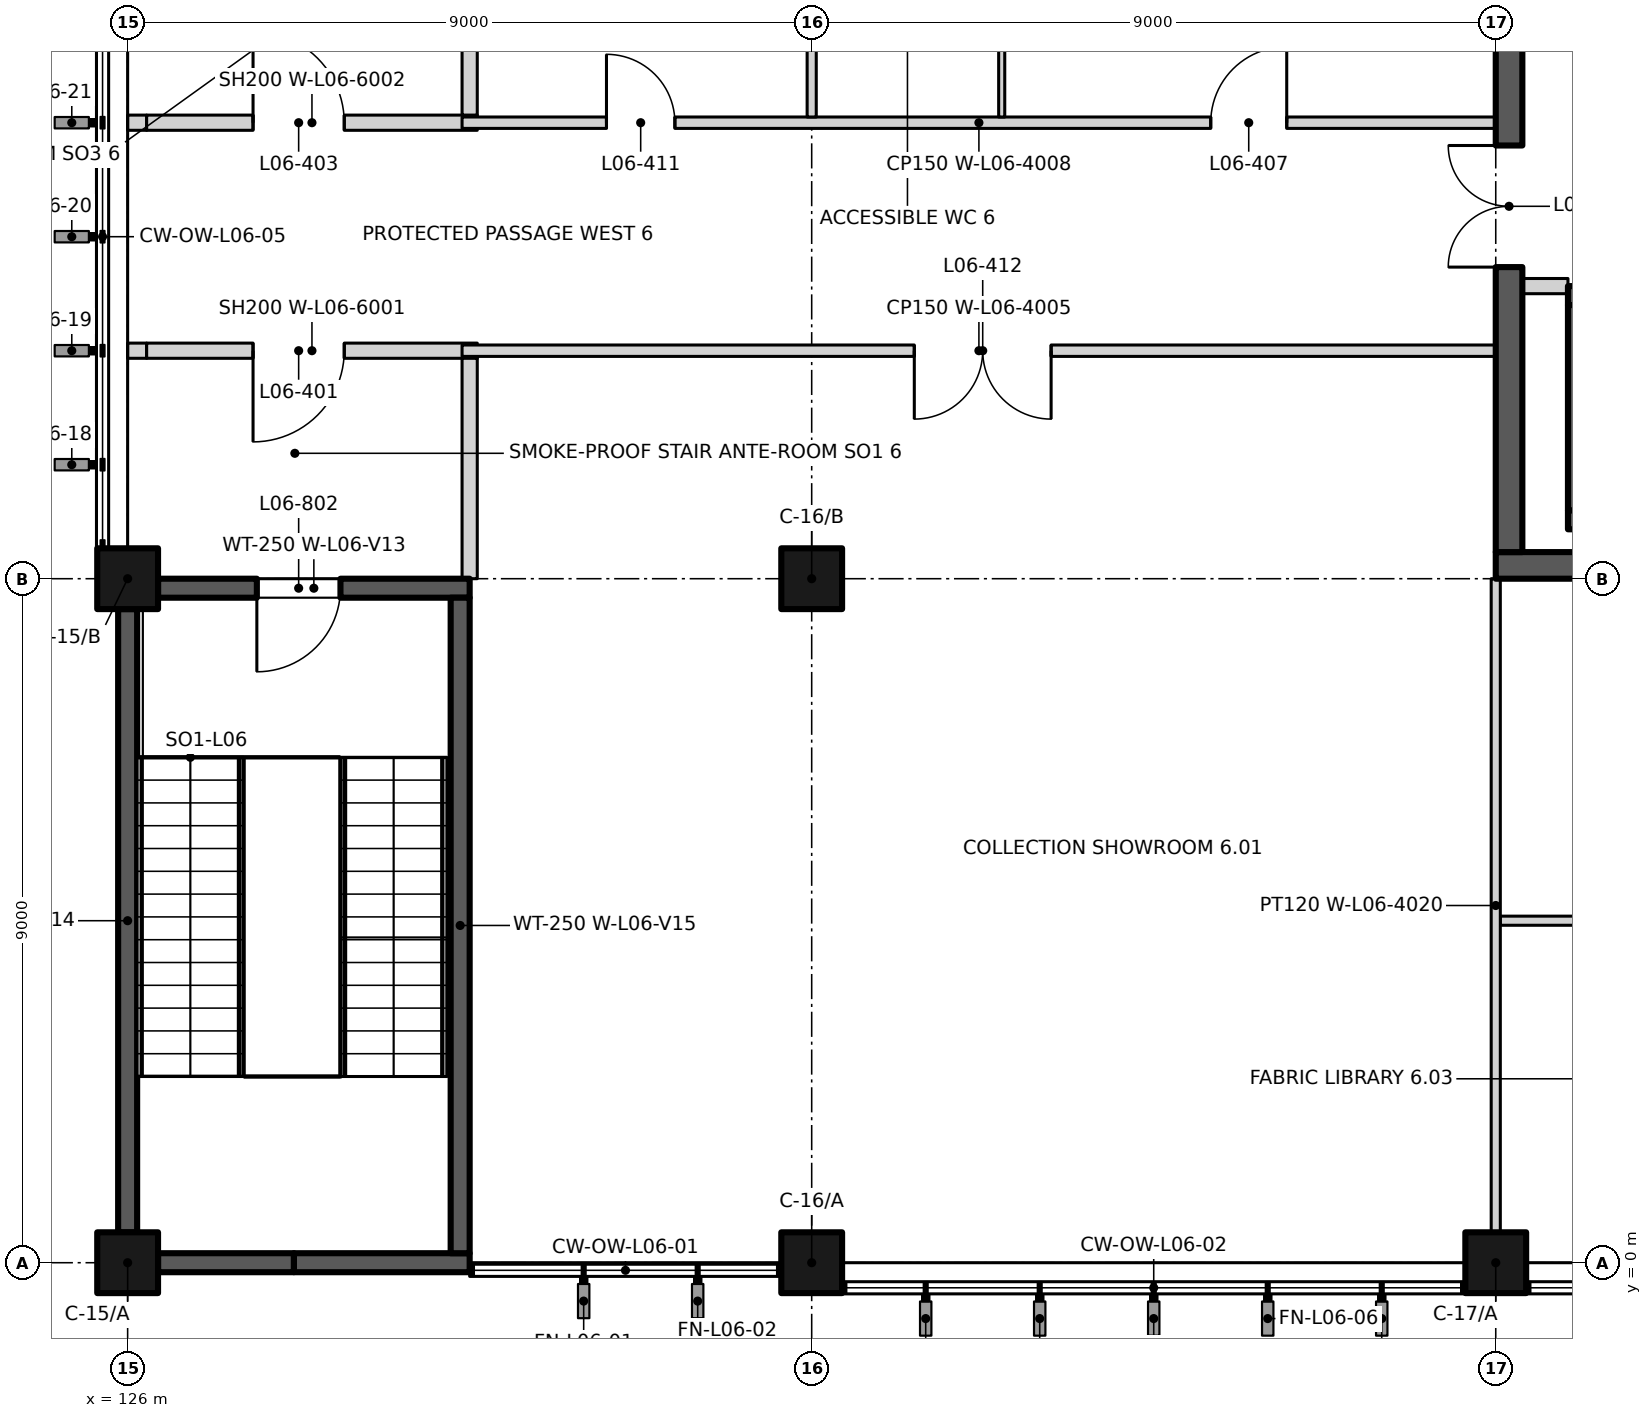
"""IFC4 building model, lengths in metres.
Left out: names, types, materials, properties, quantities, classifications, styles, units other than length and angle.
Written with IfcOpenShell. Run it as: python <this file> out.ifc"""

import sys

from ifc_helpers import new_model, si_unit, direction, frame, frame_2d, origin, origin_2d, place, context, subcontext, project, spatial, rectangle, extrude, element, fill, save


model = new_model("IFC4")
c1 = context("Model", 3, precision=1e-05, world=origin(), true_north=direction((0.0, 1.0)))
c2 = subcontext(c1, "Body", "Model", "MODEL_VIEW")
j1 = project(units=[si_unit("LENGTHUNIT", "METRE"), si_unit("PLANEANGLEUNIT", "RADIAN")], contexts=[c1])
p1 = place(None, origin())
s1 = spatial("IfcSite", under=j1, at=p1, CompositionType="ELEMENT")
p2 = place(p1, origin())
s2 = spatial("IfcBuilding", under=s1, at=p2, CompositionType="ELEMENT")
p3 = place(p2, frame((0.0, 0.0, 28.5)))
s3 = spatial("IfcBuildingStorey", under=s2, at=p3, CompositionType="ELEMENT", Elevation=28.5)
for number, where, z_axis, x_axis in (
    (1, (126.0, 0.0, 0.0), (0.0, 0.0, 1.0), (1.0, 0.0, 0.0)),
    (2, (135.0, 0.0, 0.0), (0.0, 0.0, 1.0), (1.0, 0.0, 0.0)),
    (3, (144.0, 0.0, 0.0), (0.0, 0.0, 1.0), (1.0, 0.0, 0.0)),
    (4, (126.0, 9.0, 0.0), (0.0, 0.0, 1.0), (1.0, 0.0, 0.0)),
    (5, (135.0, 9.0, 0.0), (0.0, 0.0, 1.0), (1.0, 0.0, 0.0)),
):
    element("IfcColumn", number, at=place(p3, frame(where, z_axis=z_axis, x_axis=x_axis)), inside=s3, PredefinedType="COLUMN", context=c2, shape_type="SweptSolid", body=[
        extrude(rectangle(XDim=0.8, YDim=0.8, at=origin_2d()), origin(), (0.0, 0.0, 1.0), 4.5),
    ])
p4 = place(p3, frame((126.4, 0.0, 0.0), z_axis=(0.0, 0.0, 1.0), x_axis=(1.0, 0.0, 0.0)))
e6 = element("IfcWall", 6, at=p4, inside=s3, PredefinedType="SHEAR", context=c2, shape_type="SweptSolid", body=[
    extrude(rectangle(XDim=1.788, YDim=0.25, at=frame_2d((0.894, 0.0))), origin(), (0.0, 0.0, 1.0), 4.5),
])
p5 = place(p3, frame((128.188, 0.0, 0.0), z_axis=(0.0, 0.0, 1.0), x_axis=(1.0, 0.0, 0.0)))
e7 = element("IfcWall", 7, at=p5, inside=s3, PredefinedType="SHEAR", context=c2, shape_type="SweptSolid", body=[
    extrude(rectangle(XDim=2.312, YDim=0.25, at=frame_2d((1.156, 0.0))), origin(), (0.0, 0.0, 1.0), 4.5),
])
p6 = place(p3, frame((126.4, 8.875, 0.0), z_axis=(0.0, 0.0, 1.0), x_axis=(1.0, 0.0, 0.0)))
e8 = element("IfcWall", 8, at=p6, inside=s3, PredefinedType="SHEAR", context=c2, shape_type="SweptSolid", body=[
    extrude(rectangle(XDim=4.1, YDim=0.25, at=frame_2d((2.05, 0.0))), origin(), (0.0, 0.0, 1.0), 4.5),
])
p7 = place(p6, frame((2.4, 0.0, 0.0), z_axis=(0.0, 0.0, 1.0), x_axis=(-1.0, 0.0, 0.0)))
e9 = element("IfcOpeningElement", 9, at=p7, cuts=e8, PredefinedType="OPENING", context=c2, shape_type="SweptSolid", body=[
    extrude(rectangle(XDim=1.1, YDim=2.1, at=frame_2d((0.55, 1.05))), frame((0.0, 0.135, 0.0), z_axis=(0.0, -1.0, 0.0), x_axis=(1.0, 0.0, 0.0)), (0.0, 0.0, 1.0), 0.27),
])
p8 = place(p3, frame((126.0, 0.4, 0.0), z_axis=(0.0, 0.0, 1.0), x_axis=(0.0, 1.0, 0.0)))
e10 = element("IfcWall", 10, at=p8, inside=s3, PredefinedType="SHEAR", context=c2, shape_type="SweptSolid", body=[
    extrude(rectangle(XDim=8.2, YDim=0.25, at=frame_2d((4.1, 0.0))), origin(), (0.0, 0.0, 1.0), 4.5),
])
p9 = place(p3, frame((130.375, 0.125, 0.0), z_axis=(0.0, 0.0, 1.0), x_axis=(0.0, 1.0, 0.0)))
e11 = element("IfcWall", 11, at=p9, inside=s3, PredefinedType="SHEAR", context=c2, shape_type="SweptSolid", body=[
    extrude(rectangle(XDim=8.625, YDim=0.25, at=frame_2d((4.312, 0.0))), origin(), (0.0, 0.0, 1.0), 4.5),
])
p10 = place(p3, frame((144.95, 12.725, 0.0), z_axis=(0.0, 0.0, 1.0), x_axis=(1.0, 0.0, 0.0)))
e12 = element("IfcWall", 12, at=p10, inside=s3, PredefinedType="SHEAR", context=c2, shape_type="SweptSolid", body=[
    extrude(rectangle(XDim=12.05, YDim=0.25, at=frame_2d((6.025, 0.0))), origin(), (0.0, 0.0, 1.0), 4.5),
])
p11 = place(p10, frame((1.05, 0.0, 0.0)))
e13 = element("IfcOpeningElement", 13, at=p11, cuts=e12, PredefinedType="OPENING", context=c2, shape_type="SweptSolid", body=[
    extrude(rectangle(XDim=1.1, YDim=2.1, at=frame_2d((0.55, 1.05))), frame((0.0, 0.135, 0.0), z_axis=(0.0, -1.0, 0.0), x_axis=(1.0, 0.0, 0.0)), (0.0, 0.0, 1.0), 0.27),
])
p12 = place(p10, frame((4.0, 0.0, 0.0)))
e14 = element("IfcOpeningElement", 14, at=p12, cuts=e12, PredefinedType="OPENING", context=c2, shape_type="SweptSolid", body=[
    extrude(rectangle(XDim=1.1, YDim=2.1, at=frame_2d((0.55, 1.05))), frame((0.0, 0.135, 0.0), z_axis=(0.0, -1.0, 0.0), x_axis=(1.0, 0.0, 0.0)), (0.0, 0.0, 1.0), 0.27),
])
p13 = place(p10, frame((6.95, 0.0, 0.0)))
e15 = element("IfcOpeningElement", 15, at=p13, cuts=e12, PredefinedType="OPENING", context=c2, shape_type="SweptSolid", body=[
    extrude(rectangle(XDim=1.1, YDim=2.1, at=frame_2d((0.55, 1.05))), frame((0.0, 0.135, 0.0), z_axis=(0.0, -1.0, 0.0), x_axis=(1.0, 0.0, 0.0)), (0.0, 0.0, 1.0), 0.27),
])
p14 = place(p10, frame((9.9, 0.0, 0.0)))
e16 = element("IfcOpeningElement", 16, at=p14, cuts=e12, PredefinedType="OPENING", context=c2, shape_type="SweptSolid", body=[
    extrude(rectangle(XDim=1.1, YDim=2.1, at=frame_2d((0.55, 1.05))), frame((0.0, 0.135, 0.0), z_axis=(0.0, -1.0, 0.0), x_axis=(1.0, 0.0, 0.0)), (0.0, 0.0, 1.0), 0.27),
])
p15 = place(p3, frame((144.95, 9.775, 0.0), z_axis=(0.0, 0.0, 1.0), x_axis=(1.0, 0.0, 0.0)))
e17 = element("IfcWall", 17, at=p15, inside=s3, PredefinedType="SHEAR", context=c2, shape_type="SweptSolid", body=[
    extrude(rectangle(XDim=12.05, YDim=0.25, at=frame_2d((6.025, 0.0))), origin(), (0.0, 0.0, 1.0), 4.5),
])
p16 = place(p3, frame((145.075, 9.9, 0.0), z_axis=(0.0, 0.0, 1.0), x_axis=(0.0, 1.0, 0.0)))
e18 = element("IfcWall", 18, at=p16, inside=s3, PredefinedType="SHEAR", context=c2, shape_type="SweptSolid", body=[
    extrude(rectangle(XDim=2.7, YDim=0.25, at=frame_2d((1.35, 0.0))), origin(), (0.0, 0.0, 1.0), 4.5),
])
p17 = place(p3, frame((144.06, 4.5, 0.0), z_axis=(0.0, 0.0, 1.0), x_axis=(1.0, 0.0, 0.0)))
e19 = element("IfcWall", 19, at=p17, inside=s3, PredefinedType="PARTITIONING", context=c2, shape_type="SweptSolid", body=[
    extrude(rectangle(XDim=3.0, YDim=0.12, at=frame_2d((1.5, 0.0))), origin(), (0.0, 0.0, 1.0), 4.2),
])
p18 = place(p17, frame((1.89, 0.0, 0.0), z_axis=(0.0, 0.0, 1.0), x_axis=(-1.0, 0.0, 0.0)))
e20 = element("IfcOpeningElement", 20, at=p18, cuts=e19, PredefinedType="OPENING", context=c2, shape_type="SweptSolid", body=[
    extrude(rectangle(XDim=0.9, YDim=2.1, at=frame_2d((0.45, 1.05))), frame((0.0, 0.07, 0.0), z_axis=(0.0, -1.0, 0.0), x_axis=(1.0, 0.0, 0.0)), (0.0, 0.0, 1.0), 0.14),
])
p19 = place(p3, frame((144.0, 9.175, 0.0), z_axis=(0.0, 0.0, 1.0), x_axis=(1.0, 0.0, 0.0)))
e21 = element("IfcWall", 21, at=p19, inside=s3, PredefinedType="SHEAR", context=c2, shape_type="SweptSolid", body=[
    extrude(rectangle(XDim=18.0, YDim=0.35, at=frame_2d((9.0, 0.0))), origin(), (0.0, 0.0, 1.0), 4.2),
])
p20 = place(p19, frame((16.463, 0.0, 0.0), z_axis=(0.0, 0.0, 1.0), x_axis=(-1.0, 0.0, 0.0)))
e22 = element("IfcOpeningElement", 22, at=p20, cuts=e21, PredefinedType="OPENING", context=c2, shape_type="SweptSolid", body=[
    extrude(rectangle(XDim=2.1, YDim=2.4, at=frame_2d((1.05, 1.2))), frame((0.0, 0.185, 0.0), z_axis=(0.0, -1.0, 0.0), x_axis=(1.0, 0.0, 0.0)), (0.0, 0.0, 1.0), 0.37),
])
p21 = place(p3, frame((126.0, 12.0, 0.0), z_axis=(0.0, 0.0, 1.0), x_axis=(1.0, 0.0, 0.0)))
e23 = element("IfcWall", 23, at=p21, inside=s3, PredefinedType="PARTITIONING", context=c2, shape_type="SweptSolid", body=[
    extrude(rectangle(XDim=0.25, YDim=0.2, at=frame_2d((0.125, 0.0))), origin(), (0.0, 0.0, 1.0), 3.6),
])
p22 = place(p3, frame((126.25, 12.0, 0.0), z_axis=(0.0, 0.0, 1.0), x_axis=(1.0, 0.0, 0.0)))
e24 = element("IfcWall", 24, at=p22, inside=s3, PredefinedType="PARTITIONING", context=c2, shape_type="SweptSolid", body=[
    extrude(rectangle(XDim=4.35, YDim=0.2, at=frame_2d((2.175, 0.0))), origin(), (0.0, 0.0, 1.0), 4.2),
])
p23 = place(p22, frame((2.6, 0.0, 0.0), z_axis=(0.0, 0.0, 1.0), x_axis=(-1.0, 0.0, 0.0)))
e25 = element("IfcOpeningElement", 25, at=p23, cuts=e24, PredefinedType="OPENING", context=c2, shape_type="SweptSolid", body=[
    extrude(rectangle(XDim=1.2, YDim=2.1, at=frame_2d((0.6, 1.05))), frame((0.0, 0.11, 0.0), z_axis=(0.0, -1.0, 0.0), x_axis=(1.0, 0.0, 0.0)), (0.0, 0.0, 1.0), 0.22),
])
p24 = place(p3, frame((130.4, 12.0, 0.0), z_axis=(0.0, 0.0, 1.0), x_axis=(1.0, 0.0, 0.0)))
e26 = element("IfcWall", 26, at=p24, inside=s3, PredefinedType="PARTITIONING", context=c2, shape_type="SweptSolid", body=[
    extrude(rectangle(XDim=13.6, YDim=0.15, at=frame_2d((6.8, 0.0))), origin(), (0.0, 0.0, 1.0), 4.2),
])
p25 = place(p24, frame((7.75, 0.0, 0.0), z_axis=(0.0, 0.0, 1.0), x_axis=(-1.0, 0.0, 0.0)))
e27 = element("IfcOpeningElement", 27, at=p25, cuts=e26, PredefinedType="OPENING", context=c2, shape_type="SweptSolid", body=[
    extrude(rectangle(XDim=1.8, YDim=2.1, at=frame_2d((0.9, 1.05))), frame((0.0, 0.085, 0.0), z_axis=(0.0, -1.0, 0.0), x_axis=(1.0, 0.0, 0.0)), (0.0, 0.0, 1.0), 0.17),
])
p26 = place(p3, frame((144.35, 12.85, 0.0), z_axis=(0.0, 0.0, 1.0), x_axis=(1.0, 0.0, 0.0)))
e28 = element("IfcWall", 28, at=p26, inside=s3, PredefinedType="PARTITIONING", context=c2, shape_type="SweptSolid", body=[
    extrude(rectangle(XDim=0.6, YDim=0.2, at=frame_2d((0.3, 0.0))), origin(), (0.0, 0.0, 1.0), 4.2),
])
p27 = place(p3, frame((126.0, 15.0, 0.0), z_axis=(0.0, 0.0, 1.0), x_axis=(1.0, 0.0, 0.0)))
e29 = element("IfcWall", 29, at=p27, inside=s3, PredefinedType="PARTITIONING", context=c2, shape_type="SweptSolid", body=[
    extrude(rectangle(XDim=0.25, YDim=0.2, at=frame_2d((0.125, 0.0))), origin(), (0.0, 0.0, 1.0), 3.6),
])
p28 = place(p3, frame((126.25, 15.0, 0.0), z_axis=(0.0, 0.0, 1.0), x_axis=(1.0, 0.0, 0.0)))
e30 = element("IfcWall", 30, at=p28, inside=s3, PredefinedType="PARTITIONING", context=c2, shape_type="SweptSolid", body=[
    extrude(rectangle(XDim=4.35, YDim=0.2, at=frame_2d((2.175, 0.0))), origin(), (0.0, 0.0, 1.0), 4.2),
])
p29 = place(p28, frame((1.4, 0.0, 0.0)))
e31 = element("IfcOpeningElement", 31, at=p29, cuts=e30, PredefinedType="OPENING", context=c2, shape_type="SweptSolid", body=[
    extrude(rectangle(XDim=1.2, YDim=2.1, at=frame_2d((0.6, 1.05))), frame((0.0, 0.11, 0.0), z_axis=(0.0, -1.0, 0.0), x_axis=(1.0, 0.0, 0.0)), (0.0, 0.0, 1.0), 0.22),
])
p30 = place(p3, frame((130.4, 15.0, 0.0), z_axis=(0.0, 0.0, 1.0), x_axis=(1.0, 0.0, 0.0)))
e32 = element("IfcWall", 32, at=p30, inside=s3, PredefinedType="PARTITIONING", context=c2, shape_type="SweptSolid", body=[
    extrude(rectangle(XDim=13.6, YDim=0.15, at=frame_2d((6.8, 0.0))), origin(), (0.0, 0.0, 1.0), 4.2),
])
p31 = place(p30, frame((9.85, 0.0, 0.0)))
e33 = element("IfcOpeningElement", 33, at=p31, cuts=e32, PredefinedType="OPENING", context=c2, shape_type="SweptSolid", body=[
    extrude(rectangle(XDim=1.0, YDim=2.1, at=frame_2d((0.5, 1.05))), frame((0.0, 0.085, 0.0), z_axis=(0.0, -1.0, 0.0), x_axis=(1.0, 0.0, 0.0)), (0.0, 0.0, 1.0), 0.17),
])
p32 = place(p30, frame((1.9, 0.0, 0.0)))
e34 = element("IfcOpeningElement", 34, at=p32, cuts=e32, PredefinedType="OPENING", context=c2, shape_type="SweptSolid", body=[
    extrude(rectangle(XDim=0.9, YDim=2.1, at=frame_2d((0.45, 1.05))), frame((0.0, 0.085, 0.0), z_axis=(0.0, -1.0, 0.0), x_axis=(1.0, 0.0, 0.0)), (0.0, 0.0, 1.0), 0.17),
])
for number, where, z_axis, x_axis in (
    (35, (130.5, 9.0, 0.0), (0.0, 0.0, 1.0), (0.0, 1.0, 0.0)),
    (36, (130.5, 15.1, 0.0), (0.0, 0.0, 1.0), (0.0, 1.0, 0.0)),
):
    element("IfcWall", number, at=place(p3, frame(where, z_axis=z_axis, x_axis=x_axis)), inside=s3, PredefinedType="PARTITIONING", context=c2, shape_type="SweptSolid", body=[
        extrude(rectangle(XDim=2.9, YDim=0.2, at=frame_2d((1.45, 0.0))), origin(), (0.0, 0.0, 1.0), 4.2),
    ])
p33 = place(p3, frame((135.0, 15.075, 0.0), z_axis=(0.0, 0.0, 1.0), x_axis=(0.0, 1.0, 0.0)))
e37 = element("IfcWall", 37, at=p33, inside=s3, PredefinedType="PARTITIONING", context=c2, shape_type="SweptSolid", body=[
    extrude(rectangle(XDim=2.525, YDim=0.12, at=frame_2d((1.263, 0.0))), origin(), (0.0, 0.0, 1.0), 4.2),
])
p34 = place(p3, frame((137.5, 15.075, 0.0), z_axis=(0.0, 0.0, 1.0), x_axis=(0.0, 1.0, 0.0)))
e38 = element("IfcWall", 38, at=p34, inside=s3, PredefinedType="PARTITIONING", context=c2, shape_type="SweptSolid", body=[
    extrude(rectangle(XDim=4.385, YDim=0.08, at=frame_2d((2.192, 0.0))), origin(), (0.0, 0.0, 1.0), 4.2),
])
p35 = place(p34, frame((1.675, 0.0, 0.0)))
e39 = element("IfcOpeningElement", 39, at=p35, cuts=e38, PredefinedType="OPENING", context=c2, shape_type="SweptSolid", body=[
    extrude(rectangle(XDim=1.0, YDim=2.1, at=frame_2d((0.5, 1.05))), frame((0.0, 0.05, 0.0), z_axis=(0.0, -1.0, 0.0), x_axis=(1.0, 0.0, 0.0)), (0.0, 0.0, 1.0), 0.1),
])
p36 = place(p3, frame((144.0, 0.4, 0.0), z_axis=(0.0, 0.0, 1.0), x_axis=(0.0, 1.0, 0.0)))
e40 = element("IfcWall", 40, at=p36, inside=s3, PredefinedType="PARTITIONING", context=c2, shape_type="SweptSolid", body=[
    extrude(rectangle(XDim=8.6, YDim=0.12, at=frame_2d((4.3, 0.0))), origin(), (0.0, 0.0, 1.0), 4.2),
])
p37 = place(p3, frame((144.175, 9.35, 0.0), z_axis=(0.0, 0.0, 1.0), x_axis=(0.0, 1.0, 0.0)))
e41 = element("IfcWall", 41, at=p37, inside=s3, PredefinedType="SHEAR", context=c2, shape_type="SweptSolid", body=[
    extrude(rectangle(XDim=17.4, YDim=0.35, at=frame_2d((8.7, 0.0))), origin(), (0.0, 0.0, 1.0), 4.2),
])
p38 = place(p37, frame((3.75, 0.0, 0.0)))
e42 = element("IfcOpeningElement", 42, at=p38, cuts=e41, PredefinedType="OPENING", context=c2, shape_type="SweptSolid", body=[
    extrude(rectangle(XDim=1.6, YDim=2.4, at=frame_2d((0.8, 1.2))), frame((0.0, 0.185, 0.0), z_axis=(0.0, -1.0, 0.0), x_axis=(1.0, 0.0, 0.0)), (0.0, 0.0, 1.0), 0.37),
])
p39 = place(p7, origin())
e43 = element("IfcDoor", 43, at=p39, inside=s3, OperationType="SINGLE_SWING_RIGHT", PredefinedType="DOOR", context=c2, shape_type="SweptSolid", body=[
    extrude(rectangle(XDim=1.1, YDim=2.1, at=frame_2d((0.55, 1.05))), frame((0.0, 0.025, 0.0), z_axis=(0.0, -1.0, 0.0), x_axis=(1.0, 0.0, 0.0)), (0.0, 0.0, 1.0), 0.05),
])
fill(e9, e43)
p40 = place(p23, origin())
e44 = element("IfcDoor", 44, at=p40, inside=s3, OperationType="SINGLE_SWING_RIGHT", PredefinedType="DOOR", context=c2, shape_type="SweptSolid", body=[
    extrude(rectangle(XDim=1.2, YDim=2.1, at=frame_2d((0.6, 1.05))), frame((0.0, 0.025, 0.0), z_axis=(0.0, -1.0, 0.0), x_axis=(1.0, 0.0, 0.0)), (0.0, 0.0, 1.0), 0.05),
])
fill(e25, e44)
p41 = place(p29, origin())
e45 = element("IfcDoor", 45, at=p41, inside=s3, OperationType="SINGLE_SWING_LEFT", PredefinedType="DOOR", context=c2, shape_type="SweptSolid", body=[
    extrude(rectangle(XDim=1.2, YDim=2.1, at=frame_2d((0.6, 1.05))), frame((0.0, 0.025, 0.0), z_axis=(0.0, -1.0, 0.0), x_axis=(1.0, 0.0, 0.0)), (0.0, 0.0, 1.0), 0.05),
])
fill(e31, e45)
p42 = place(p38, origin())
e46 = element("IfcDoor", 46, at=p42, inside=s3, OperationType="DOUBLE_DOOR_SINGLE_SWING", PredefinedType="DOOR", context=c2, shape_type="SweptSolid", body=[
    extrude(rectangle(XDim=1.6, YDim=2.4, at=frame_2d((0.8, 1.2))), frame((0.0, 0.025, 0.0), z_axis=(0.0, -1.0, 0.0), x_axis=(1.0, 0.0, 0.0)), (0.0, 0.0, 1.0), 0.05),
])
fill(e42, e46)
p43 = place(p31, origin())
e47 = element("IfcDoor", 47, at=p43, inside=s3, OperationType="SINGLE_SWING_RIGHT", PredefinedType="DOOR", context=c2, shape_type="SweptSolid", body=[
    extrude(rectangle(XDim=1.0, YDim=2.1, at=frame_2d((0.5, 1.05))), frame((0.0, 0.025, 0.0), z_axis=(0.0, -1.0, 0.0), x_axis=(1.0, 0.0, 0.0)), (0.0, 0.0, 1.0), 0.05),
])
fill(e33, e47)
p44 = place(p32, origin())
e48 = element("IfcDoor", 48, at=p44, inside=s3, OperationType="SINGLE_SWING_LEFT", PredefinedType="DOOR", context=c2, shape_type="SweptSolid", body=[
    extrude(rectangle(XDim=0.9, YDim=2.1, at=frame_2d((0.45, 1.05))), frame((0.0, 0.025, 0.0), z_axis=(0.0, -1.0, 0.0), x_axis=(1.0, 0.0, 0.0)), (0.0, 0.0, 1.0), 0.05),
])
fill(e34, e48)
p45 = place(p25, origin())
e49 = element("IfcDoor", 49, at=p45, inside=s3, OperationType="DOUBLE_DOOR_SINGLE_SWING", PredefinedType="DOOR", context=c2, shape_type="SweptSolid", body=[
    extrude(rectangle(XDim=1.8, YDim=2.1, at=frame_2d((0.9, 1.05))), frame((0.0, 0.025, 0.0), z_axis=(0.0, -1.0, 0.0), x_axis=(1.0, 0.0, 0.0)), (0.0, 0.0, 1.0), 0.05),
])
fill(e27, e49)
save(model, sys.argv[1])
